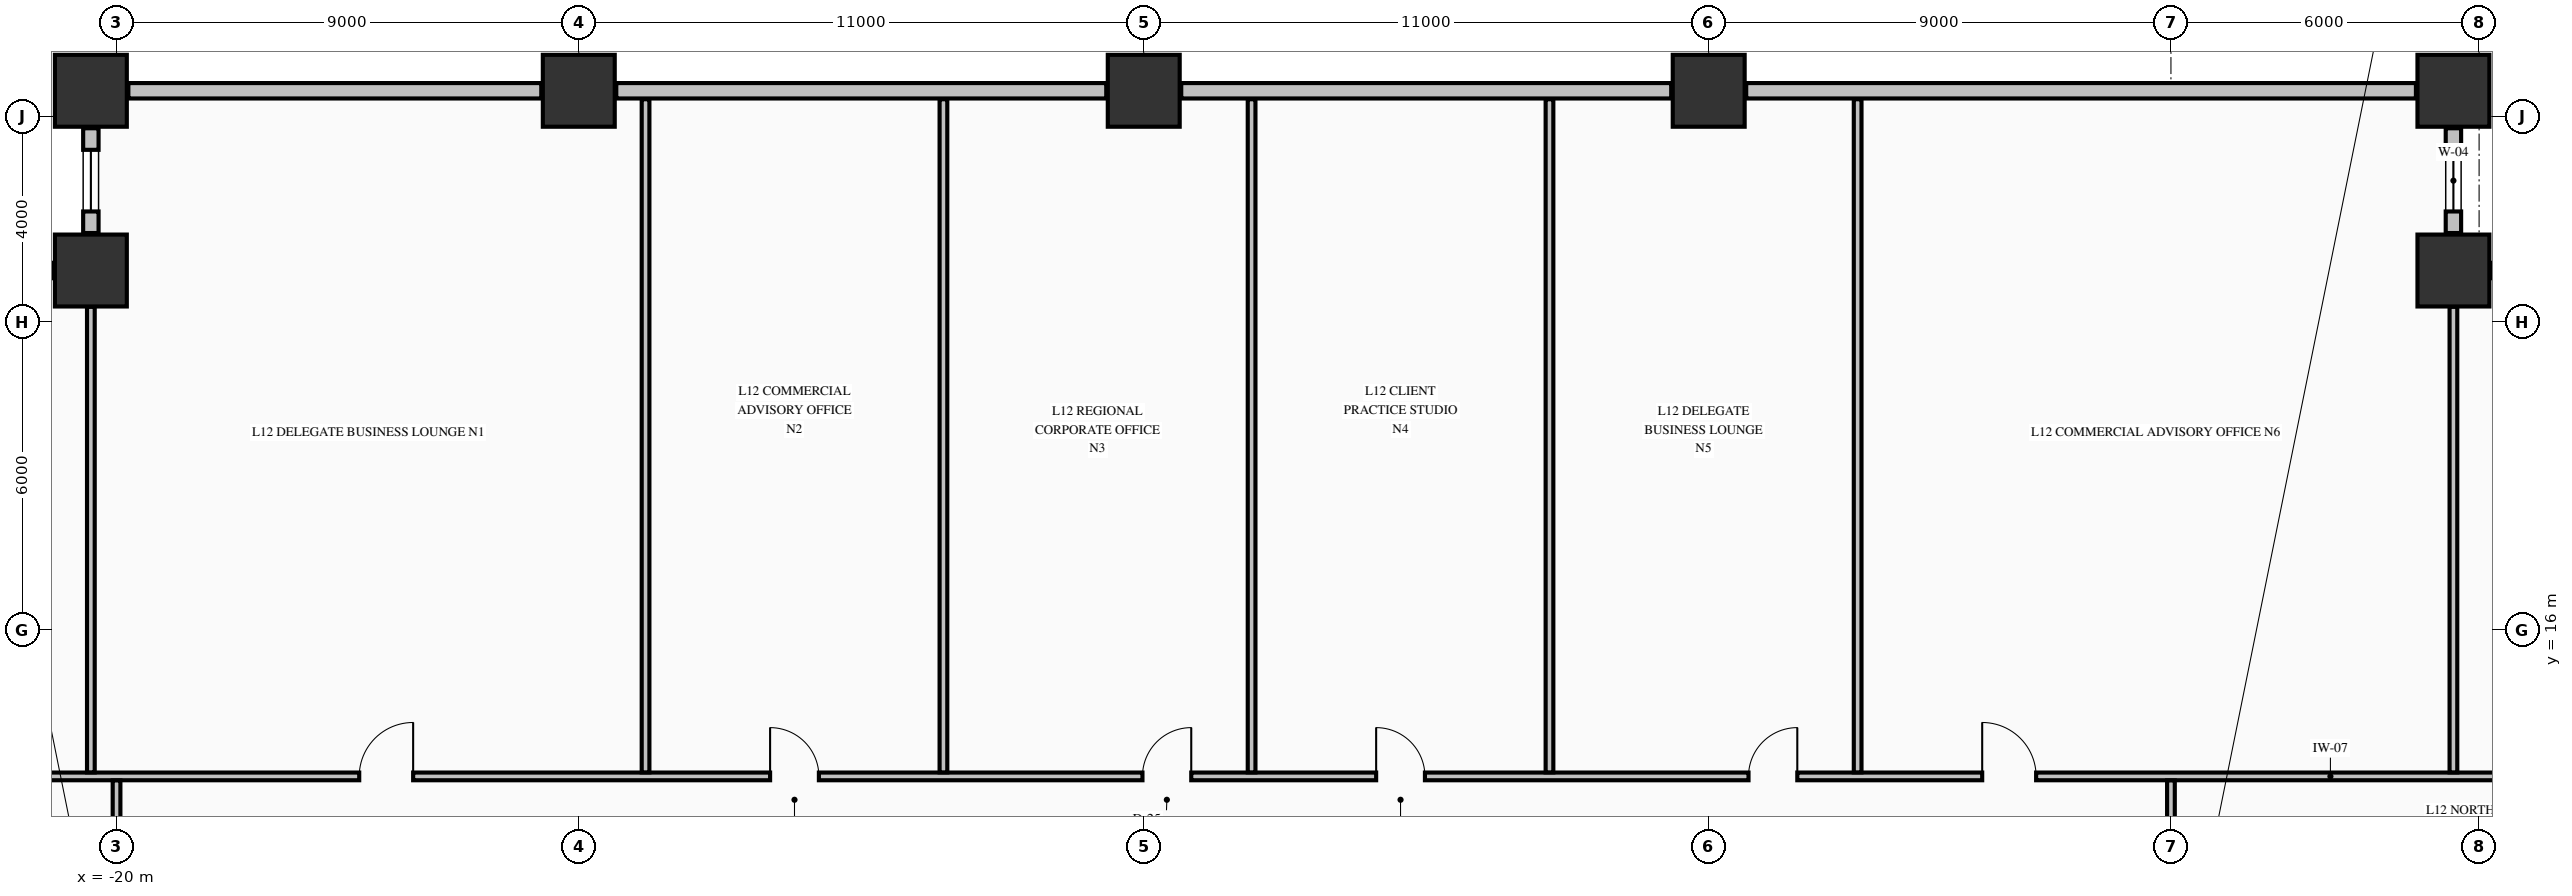
"""IFC4 building model, lengths in metres.
Left out: names, types, materials, properties, quantities, classifications, styles, units other than length and angle.
Written with IfcOpenShell. Run it as: python <this file> out.ifc"""

import sys

from ifc_helpers import new_model, si_unit, direction, frame, frame_2d, origin, origin_2d, place, context, subcontext, project, spatial, rectangle, extrude, element, fill, save


model = new_model("IFC4")
c1 = context("Model", 3, precision=1e-05, world=origin(), true_north=direction((0.0, 1.0)))
c2 = subcontext(c1, "Body", "Model", "MODEL_VIEW")
j1 = project(units=[si_unit("LENGTHUNIT", "METRE"), si_unit("PLANEANGLEUNIT", "RADIAN")], contexts=[c1])
p1 = place(None, origin())
s1 = spatial("IfcSite", under=j1, at=p1, CompositionType="ELEMENT")
p2 = place(p1, origin())
s2 = spatial("IfcBuilding", under=s1, at=p2, CompositionType="ELEMENT")
p3 = place(p2, frame((0.0, 0.0, 52.19)))
s3 = spatial("IfcBuildingStorey", under=s2, at=p3, CompositionType="ELEMENT", Elevation=52.19)
for number, where, z_axis, x_axis in (
    (1, (-20.5, 26.5, -0.425), (0.0, 0.0, 1.0), (1.0, 0.0, 0.0)),
    (2, (-11.0, 26.5, -0.425), (0.0, 0.0, 1.0), (1.0, 0.0, 0.0)),
    (3, (0.0, 26.5, -0.425), (0.0, 0.0, 1.0), (1.0, 0.0, 0.0)),
    (4, (11.0, 26.5, -0.425), (0.0, 0.0, 1.0), (1.0, 0.0, 0.0)),
    (5, (25.5, 26.5, -0.425), (0.0, 0.0, 1.0), (1.0, 0.0, 0.0)),
    (6, (25.5, 23.0, -0.425), (0.0, 0.0, 1.0), (1.0, 0.0, 0.0)),
    (7, (-20.5, 23.0, -0.425), (0.0, 0.0, 1.0), (1.0, 0.0, 0.0)),
):
    element("IfcColumn", number, at=place(p3, frame(where, z_axis=z_axis, x_axis=x_axis)), inside=s3, PredefinedType="COLUMN", context=c2, shape_type="SweptSolid", body=[
        extrude(rectangle(XDim=1.4, YDim=1.4, at=origin_2d()), origin(), (0.0, 0.0, 1.0), 5.0),
    ])
p4 = place(p3, frame((28.27, 23.0, 0.0), z_axis=(0.0, 0.0, 1.0), x_axis=(-1.0, 0.0, 0.0)))
e8 = element("IfcWall", 8, at=p4, inside=s3, PredefinedType="STANDARD", context=c2, shape_type="SweptSolid", body=[
    extrude(rectangle(XDim=2.04, YDim=0.3, at=frame_2d((1.02, 0.0))), origin(), (0.0, 0.0, 1.0), 2.167),
])
p5 = place(p3, frame((25.5, 23.73, 0.0), z_axis=(0.0, 0.0, 1.0), x_axis=(0.0, 1.0, 0.0)))
e9 = element("IfcWall", 9, at=p5, inside=s3, PredefinedType="STANDARD", context=c2, shape_type="SweptSolid", body=[
    extrude(rectangle(XDim=2.04, YDim=0.3, at=frame_2d((1.02, 0.0))), origin(), (0.0, 0.0, 1.0), 2.767),
])
p6 = place(p5, frame((0.42, 0.0, 0.82)))
e10 = element("IfcOpeningElement", 10, at=p6, cuts=e9, PredefinedType="OPENING", context=c2, shape_type="SweptSolid", body=[
    extrude(rectangle(XDim=1.2, YDim=1.65, at=frame_2d((0.6, 0.825))), frame((0.0, 0.16, 0.0), z_axis=(0.0, -1.0, 0.0), x_axis=(1.0, 0.0, 0.0)), (0.0, 0.0, 1.0), 0.32),
])
p7 = place(p3, frame((-20.5, 25.77, 0.0), z_axis=(0.0, 0.0, 1.0), x_axis=(0.0, -1.0, 0.0)))
e11 = element("IfcWall", 11, at=p7, inside=s3, PredefinedType="STANDARD", context=c2, shape_type="SweptSolid", body=[
    extrude(rectangle(XDim=2.04, YDim=0.3, at=frame_2d((1.02, 0.0))), origin(), (0.0, 0.0, 1.0), 2.767),
])
p8 = place(p7, frame((0.42, 0.0, 0.82)))
e12 = element("IfcOpeningElement", 12, at=p8, cuts=e11, PredefinedType="OPENING", context=c2, shape_type="SweptSolid", body=[
    extrude(rectangle(XDim=1.2, YDim=1.65, at=frame_2d((0.6, 0.825))), frame((0.0, 0.16, 0.0), z_axis=(0.0, -1.0, 0.0), x_axis=(1.0, 0.0, 0.0)), (0.0, 0.0, 1.0), 0.32),
])
p9 = place(p3, frame((-21.23, 23.0, 0.0), z_axis=(0.0, 0.0, 1.0), x_axis=(-1.0, 0.0, 0.0)))
e13 = element("IfcWall", 13, at=p9, inside=s3, PredefinedType="STANDARD", context=c2, shape_type="SweptSolid", body=[
    extrude(rectangle(XDim=2.04, YDim=0.3, at=frame_2d((1.02, 0.0))), origin(), (0.0, 0.0, 1.0), 2.167),
])
p10 = place(p3, frame((-11.73, 26.5, 0.0), z_axis=(0.0, 0.0, 1.0), x_axis=(-1.0, 0.0, 0.0)))
e14 = element("IfcWall", 14, at=p10, inside=s3, PredefinedType="STANDARD", context=c2, shape_type="SweptSolid", body=[
    extrude(rectangle(XDim=8.04, YDim=0.3, at=frame_2d((4.02, 0.0))), origin(), (0.0, 0.0, 1.0), 2.167),
])
for number, where, z_axis, x_axis in (
    (15, (-0.73, 26.5, 0.0), (0.0, 0.0, 1.0), (-1.0, 0.0, 0.0)),
    (16, (10.27, 26.5, 0.0), (0.0, 0.0, 1.0), (-1.0, 0.0, 0.0)),
):
    element("IfcWall", number, at=place(p3, frame(where, z_axis=z_axis, x_axis=x_axis)), inside=s3, PredefinedType="STANDARD", context=c2, shape_type="SweptSolid", body=[
        extrude(rectangle(XDim=9.54, YDim=0.3, at=frame_2d((4.77, 0.0))), origin(), (0.0, 0.0, 1.0), 2.167),
    ])
p11 = place(p3, frame((24.77, 26.5, 0.0), z_axis=(0.0, 0.0, 1.0), x_axis=(-1.0, 0.0, 0.0)))
e17 = element("IfcWall", 17, at=p11, inside=s3, PredefinedType="STANDARD", context=c2, shape_type="SweptSolid", body=[
    extrude(rectangle(XDim=13.04, YDim=0.3, at=frame_2d((6.52, 0.0))), origin(), (0.0, 0.0, 1.0), 2.167),
])
p12 = place(p3, frame((-23.835, 13.15, 0.0), z_axis=(0.0, 0.0, 1.0), x_axis=(1.0, 0.0, 0.0)))
e18 = element("IfcWall", 18, at=p12, inside=s3, PredefinedType="PARTITIONING", context=c2, shape_type="SweptSolid", body=[
    extrude(rectangle(XDim=52.67, YDim=0.15, at=frame_2d((26.335, 0.0))), origin(), (0.0, 0.0, 1.0), 4.575),
])
p13 = place(p12, frame((8.56, 0.0, 0.0)))
e19 = element("IfcOpeningElement", 19, at=p13, cuts=e18, PredefinedType="OPENING", context=c2, shape_type="SweptSolid", body=[
    extrude(rectangle(XDim=1.05, YDim=2.15, at=frame_2d((0.525, 1.075))), frame((0.0, 0.085, 0.0), z_axis=(0.0, -1.0, 0.0), x_axis=(1.0, 0.0, 0.0)), (0.0, 0.0, 1.0), 0.17),
])
p14 = place(p12, frame((16.56, 0.0, 0.0)))
e20 = element("IfcOpeningElement", 20, at=p14, cuts=e18, PredefinedType="OPENING", context=c2, shape_type="SweptSolid", body=[
    extrude(rectangle(XDim=0.95, YDim=2.15, at=frame_2d((0.475, 1.075))), frame((0.0, 0.085, 0.0), z_axis=(0.0, -1.0, 0.0), x_axis=(1.0, 0.0, 0.0)), (0.0, 0.0, 1.0), 0.17),
])
p15 = place(p12, frame((23.81, 0.0, 0.0)))
e21 = element("IfcOpeningElement", 21, at=p15, cuts=e18, PredefinedType="OPENING", context=c2, shape_type="SweptSolid", body=[
    extrude(rectangle(XDim=0.95, YDim=2.02, at=frame_2d((0.475, 1.01))), frame((0.0, 0.085, 0.0), z_axis=(0.0, -1.0, 0.0), x_axis=(1.0, 0.0, 0.0)), (0.0, 0.0, 1.0), 0.17),
])
p16 = place(p12, frame((28.36, 0.0, 0.0)))
e22 = element("IfcOpeningElement", 22, at=p16, cuts=e18, PredefinedType="OPENING", context=c2, shape_type="SweptSolid", body=[
    extrude(rectangle(XDim=0.95, YDim=2.15, at=frame_2d((0.475, 1.075))), frame((0.0, 0.085, 0.0), z_axis=(0.0, -1.0, 0.0), x_axis=(1.0, 0.0, 0.0)), (0.0, 0.0, 1.0), 0.17),
])
p17 = place(p12, frame((35.61, 0.0, 0.0)))
e23 = element("IfcOpeningElement", 23, at=p17, cuts=e18, PredefinedType="OPENING", context=c2, shape_type="SweptSolid", body=[
    extrude(rectangle(XDim=0.95, YDim=2.15, at=frame_2d((0.475, 1.075))), frame((0.0, 0.085, 0.0), z_axis=(0.0, -1.0, 0.0), x_axis=(1.0, 0.0, 0.0)), (0.0, 0.0, 1.0), 0.17),
])
p18 = place(p12, frame((40.16, 0.0, 0.0)))
e24 = element("IfcOpeningElement", 24, at=p18, cuts=e18, PredefinedType="OPENING", context=c2, shape_type="SweptSolid", body=[
    extrude(rectangle(XDim=1.05, YDim=2.15, at=frame_2d((0.525, 1.075))), frame((0.0, 0.085, 0.0), z_axis=(0.0, -1.0, 0.0), x_axis=(1.0, 0.0, 0.0)), (0.0, 0.0, 1.0), 0.17),
])
p19 = place(p3, frame((-20.5, 13.228, 0.0), z_axis=(0.0, 0.0, 1.0), x_axis=(0.0, 1.0, 0.0)))
e25 = element("IfcWall", 25, at=p19, inside=s3, PredefinedType="PARTITIONING", context=c2, shape_type="SweptSolid", body=[
    extrude(rectangle(XDim=9.066, YDim=0.15, at=frame_2d((4.533, 0.0))), origin(), (0.0, 0.0, 1.0), 4.575),
])
p20 = place(p3, frame((-20.0, 11.106, 0.0), z_axis=(0.0, 0.0, 1.0), x_axis=(0.0, 1.0, 0.0)))
e26 = element("IfcWall", 26, at=p20, inside=s3, PredefinedType="PARTITIONING", context=c2, shape_type="SweptSolid", body=[
    extrude(rectangle(XDim=1.966, YDim=0.15, at=frame_2d((0.983, 0.0))), origin(), (0.0, 0.0, 1.0), 4.575),
])
p21 = place(p20, frame((0.239, 0.0, 0.0)))
e27 = element("IfcOpeningElement", 27, at=p21, cuts=e26, PredefinedType="OPENING", context=c2, shape_type="SweptSolid", body=[
    extrude(rectangle(XDim=0.95, YDim=2.02, at=frame_2d((0.475, 1.01))), frame((0.0, 0.085, 0.0), z_axis=(0.0, -1.0, 0.0), x_axis=(1.0, 0.0, 0.0)), (0.0, 0.0, 1.0), 0.17),
])
for number, where, z_axis, x_axis in (
    (28, (-9.7, 13.228, 0.0), (0.0, 0.0, 1.0), (0.0, 1.0, 0.0)),
    (29, (-3.9, 13.228, 0.0), (0.0, 0.0, 1.0), (0.0, 1.0, 0.0)),
    (30, (2.1, 13.228, 0.0), (0.0, 0.0, 1.0), (0.0, 1.0, 0.0)),
    (31, (7.9, 13.228, 0.0), (0.0, 0.0, 1.0), (0.0, 1.0, 0.0)),
    (32, (13.9, 13.228, 0.0), (0.0, 0.0, 1.0), (0.0, 1.0, 0.0)),
):
    element("IfcWall", number, at=place(p3, frame(where, z_axis=z_axis, x_axis=x_axis)), inside=s3, PredefinedType="PARTITIONING", context=c2, shape_type="SweptSolid", body=[
        extrude(rectangle(XDim=13.107, YDim=0.15, at=frame_2d((6.553, 0.0))), origin(), (0.0, 0.0, 1.0), 4.575),
    ])
p22 = place(p3, frame((20.0, 11.106, 0.0), z_axis=(0.0, 0.0, 1.0), x_axis=(0.0, 1.0, 0.0)))
e33 = element("IfcWall", 33, at=p22, inside=s3, PredefinedType="PARTITIONING", context=c2, shape_type="SweptSolid", body=[
    extrude(rectangle(XDim=1.966, YDim=0.15, at=frame_2d((0.983, 0.0))), origin(), (0.0, 0.0, 1.0), 4.575),
])
p23 = place(p22, frame((0.239, 0.0, 0.0)))
e34 = element("IfcOpeningElement", 34, at=p23, cuts=e33, PredefinedType="OPENING", context=c2, shape_type="SweptSolid", body=[
    extrude(rectangle(XDim=0.95, YDim=2.02, at=frame_2d((0.475, 1.01))), frame((0.0, 0.085, 0.0), z_axis=(0.0, -1.0, 0.0), x_axis=(1.0, 0.0, 0.0)), (0.0, 0.0, 1.0), 0.17),
])
p24 = place(p3, frame((25.5, 13.228, 0.0), z_axis=(0.0, 0.0, 1.0), x_axis=(0.0, 1.0, 0.0)))
e35 = element("IfcWall", 35, at=p24, inside=s3, PredefinedType="PARTITIONING", context=c2, shape_type="SweptSolid", body=[
    extrude(rectangle(XDim=9.066, YDim=0.15, at=frame_2d((4.533, 0.0))), origin(), (0.0, 0.0, 1.0), 4.575),
])
p25 = place(p6, origin())
e36 = element("IfcWindow", 36, at=p25, inside=s3, PartitioningType="SINGLE_PANEL", PredefinedType="WINDOW", context=c2, shape_type="SweptSolid", body=[
    extrude(rectangle(XDim=1.2, YDim=1.65, at=frame_2d((0.6, 0.825))), frame((0.0, 0.03, 0.0), z_axis=(0.0, -1.0, 0.0), x_axis=(1.0, 0.0, 0.0)), (0.0, 0.0, 1.0), 0.06),
])
fill(e10, e36)
p26 = place(p8, origin())
e37 = element("IfcWindow", 37, at=p26, inside=s3, PartitioningType="SINGLE_PANEL", PredefinedType="WINDOW", context=c2, shape_type="SweptSolid", body=[
    extrude(rectangle(XDim=1.2, YDim=1.65, at=frame_2d((0.6, 0.825))), frame((0.0, 0.03, 0.0), z_axis=(0.0, -1.0, 0.0), x_axis=(1.0, 0.0, 0.0)), (0.0, 0.0, 1.0), 0.06),
])
fill(e12, e37)
p27 = place(p13, origin())
e38 = element("IfcDoor", 38, at=p27, inside=s3, OperationType="SINGLE_SWING_RIGHT", PredefinedType="DOOR", context=c2, shape_type="SweptSolid", body=[
    extrude(rectangle(XDim=1.05, YDim=2.15, at=frame_2d((0.525, 1.075))), frame((0.0, 0.025, 0.0), z_axis=(0.0, -1.0, 0.0), x_axis=(1.0, 0.0, 0.0)), (0.0, 0.0, 1.0), 0.05),
])
fill(e19, e38)
p28 = place(p14, origin())
e39 = element("IfcDoor", 39, at=p28, inside=s3, OperationType="SINGLE_SWING_LEFT", PredefinedType="DOOR", context=c2, shape_type="SweptSolid", body=[
    extrude(rectangle(XDim=0.95, YDim=2.15, at=frame_2d((0.475, 1.075))), frame((0.0, 0.025, 0.0), z_axis=(0.0, -1.0, 0.0), x_axis=(1.0, 0.0, 0.0)), (0.0, 0.0, 1.0), 0.05),
])
fill(e20, e39)
p29 = place(p15, origin())
e40 = element("IfcDoor", 40, at=p29, inside=s3, OperationType="SINGLE_SWING_RIGHT", PredefinedType="DOOR", context=c2, shape_type="SweptSolid", body=[
    extrude(rectangle(XDim=0.95, YDim=2.02, at=frame_2d((0.475, 1.01))), frame((0.0, 0.025, 0.0), z_axis=(0.0, -1.0, 0.0), x_axis=(1.0, 0.0, 0.0)), (0.0, 0.0, 1.0), 0.05),
])
fill(e21, e40)
p30 = place(p16, origin())
e41 = element("IfcDoor", 41, at=p30, inside=s3, OperationType="SINGLE_SWING_LEFT", PredefinedType="DOOR", context=c2, shape_type="SweptSolid", body=[
    extrude(rectangle(XDim=0.95, YDim=2.15, at=frame_2d((0.475, 1.075))), frame((0.0, 0.025, 0.0), z_axis=(0.0, -1.0, 0.0), x_axis=(1.0, 0.0, 0.0)), (0.0, 0.0, 1.0), 0.05),
])
fill(e22, e41)
p31 = place(p17, origin())
e42 = element("IfcDoor", 42, at=p31, inside=s3, OperationType="SINGLE_SWING_RIGHT", PredefinedType="DOOR", context=c2, shape_type="SweptSolid", body=[
    extrude(rectangle(XDim=0.95, YDim=2.15, at=frame_2d((0.475, 1.075))), frame((0.0, 0.025, 0.0), z_axis=(0.0, -1.0, 0.0), x_axis=(1.0, 0.0, 0.0)), (0.0, 0.0, 1.0), 0.05),
])
fill(e23, e42)
p32 = place(p18, origin())
e43 = element("IfcDoor", 43, at=p32, inside=s3, OperationType="SINGLE_SWING_LEFT", PredefinedType="DOOR", context=c2, shape_type="SweptSolid", body=[
    extrude(rectangle(XDim=1.05, YDim=2.15, at=frame_2d((0.525, 1.075))), frame((0.0, 0.025, 0.0), z_axis=(0.0, -1.0, 0.0), x_axis=(1.0, 0.0, 0.0)), (0.0, 0.0, 1.0), 0.05),
])
fill(e24, e43)
save(model, sys.argv[1])
